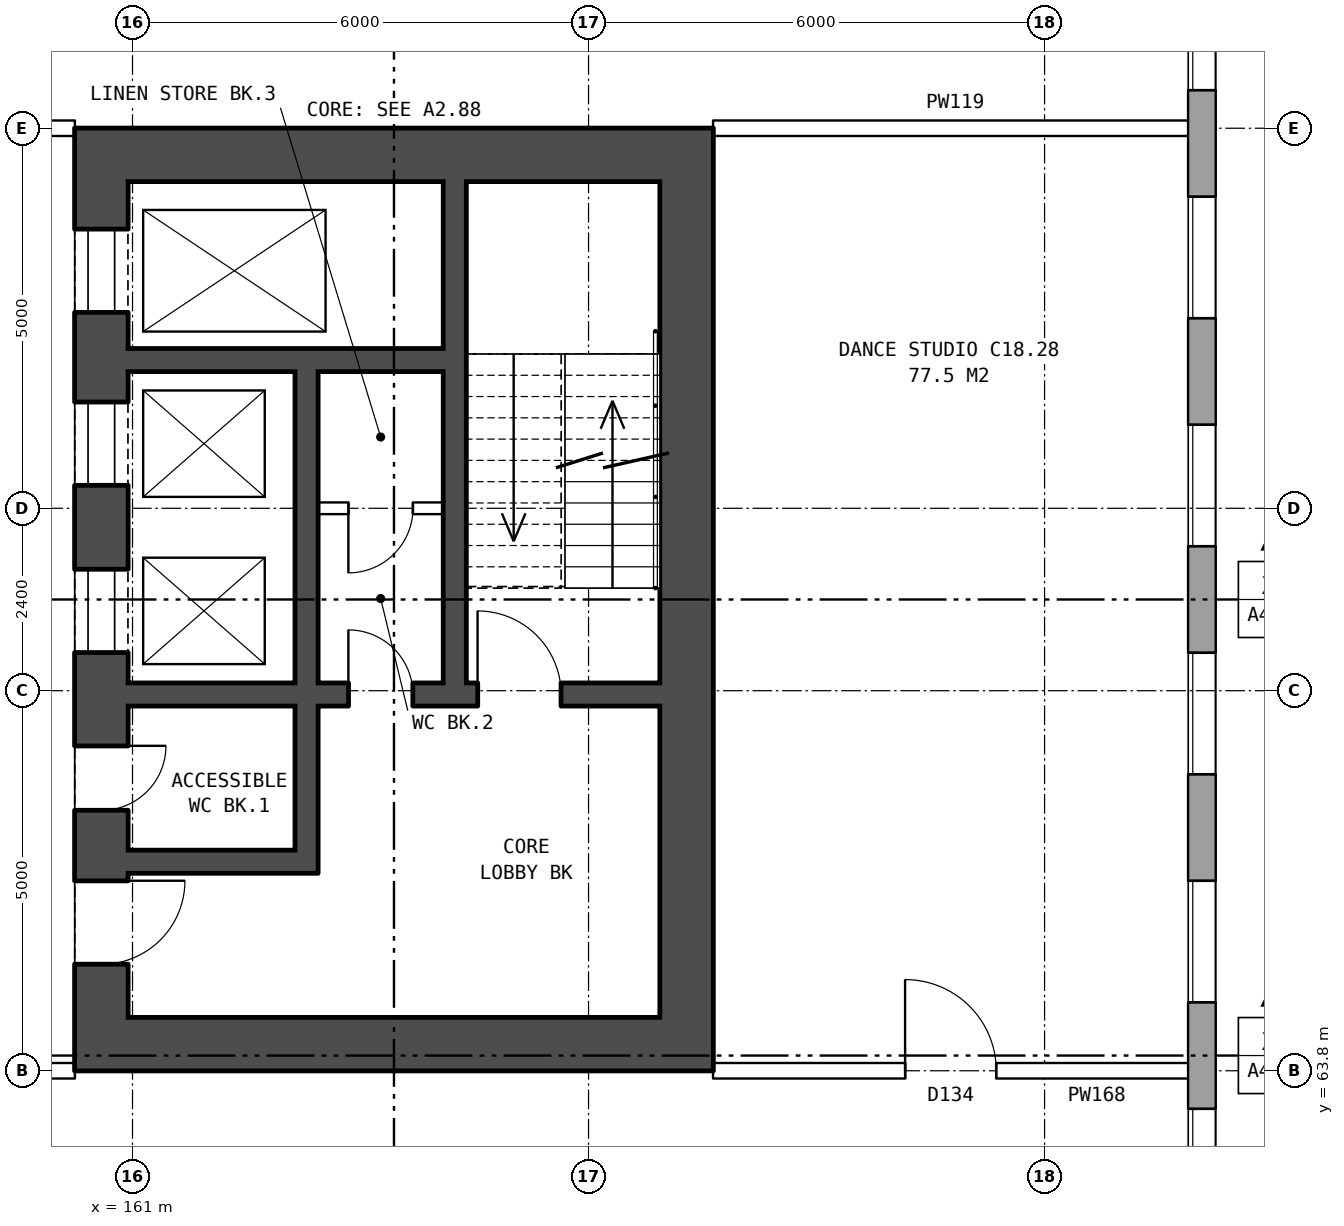
"""IFC4 building model, lengths in metres.
Left out: names, types, materials, properties, quantities, classifications, styles, units other than length and angle.
Written with IfcOpenShell. Run it as: python <this file> out.ifc"""

import sys

from ifc_helpers import new_model, si_unit, direction, frame, frame_2d, origin, place, context, subcontext, project, spatial, rectangle, extrude, element, fill, save


model = new_model("IFC4")
c1 = context("Model", 3, precision=1e-05, world=origin(), true_north=direction((0.0, 1.0)))
c2 = subcontext(c1, "Body", "Model", "MODEL_VIEW")
j1 = project(units=[si_unit("LENGTHUNIT", "METRE"), si_unit("PLANEANGLEUNIT", "RADIAN")], contexts=[c1])
p1 = place(None, origin())
s1 = spatial("IfcSite", under=j1, at=p1, CompositionType="ELEMENT")
p2 = place(p1, origin())
s2 = spatial("IfcBuilding", under=s1, at=p2, CompositionType="ELEMENT")
p3 = place(p2, frame((0.0, 0.0, 67.4)))
s3 = spatial("IfcBuildingStorey", under=s2, at=p3, CompositionType="ELEMENT", Elevation=67.4)
p4 = place(p3, frame((175.07, 57.075, 0.0), z_axis=(0.0, 0.0, 1.0), x_axis=(0.0, 1.0, 0.0)))
e1 = element("IfcWall", 1, at=p4, inside=s3, PredefinedType="STANDARD", context=c2, shape_type="SweptSolid", body=[
    extrude(rectangle(XDim=25.851, YDim=0.36, at=frame_2d((12.925, 0.0))), origin(), (0.0, 0.0, 1.0), 3.6),
])
p5 = place(p4, frame((1.625, 0.0, 0.8)))
e2 = element("IfcOpeningElement", 2, at=p5, cuts=e1, PredefinedType="OPENING", context=c2, shape_type="SweptSolid", body=[
    extrude(rectangle(XDim=1.6, YDim=1.8, at=frame_2d((0.8, 0.9))), frame((0.0, 0.19, 0.0), z_axis=(0.0, -1.0, 0.0), x_axis=(1.0, 0.0, 0.0)), (0.0, 0.0, 1.0), 0.38),
])
p6 = place(p4, frame((4.625, 0.0, 0.8)))
e3 = element("IfcOpeningElement", 3, at=p6, cuts=e1, PredefinedType="OPENING", context=c2, shape_type="SweptSolid", body=[
    extrude(rectangle(XDim=1.6, YDim=1.8, at=frame_2d((0.8, 0.9))), frame((0.0, 0.19, 0.0), z_axis=(0.0, -1.0, 0.0), x_axis=(1.0, 0.0, 0.0)), (0.0, 0.0, 1.0), 0.38),
])
p7 = place(p4, frame((7.625, 0.0, 0.8)))
e4 = element("IfcOpeningElement", 4, at=p7, cuts=e1, PredefinedType="OPENING", context=c2, shape_type="SweptSolid", body=[
    extrude(rectangle(XDim=1.6, YDim=1.8, at=frame_2d((0.8, 0.9))), frame((0.0, 0.19, 0.0), z_axis=(0.0, -1.0, 0.0), x_axis=(1.0, 0.0, 0.0)), (0.0, 0.0, 1.0), 0.38),
])
p8 = place(p4, frame((10.625, 0.0, 0.8)))
e5 = element("IfcOpeningElement", 5, at=p8, cuts=e1, PredefinedType="OPENING", context=c2, shape_type="SweptSolid", body=[
    extrude(rectangle(XDim=1.6, YDim=1.8, at=frame_2d((0.8, 0.9))), frame((0.0, 0.19, 0.0), z_axis=(0.0, -1.0, 0.0), x_axis=(1.0, 0.0, 0.0)), (0.0, 0.0, 1.0), 0.38),
])
p9 = place(p4, frame((13.625, 0.0, 0.8)))
e6 = element("IfcOpeningElement", 6, at=p9, cuts=e1, PredefinedType="OPENING", context=c2, shape_type="SweptSolid", body=[
    extrude(rectangle(XDim=1.6, YDim=1.8, at=frame_2d((0.8, 0.9))), frame((0.0, 0.19, 0.0), z_axis=(0.0, -1.0, 0.0), x_axis=(1.0, 0.0, 0.0)), (0.0, 0.0, 1.0), 0.38),
])
p10 = place(p4, frame((16.625, 0.0, 0.8)))
e7 = element("IfcOpeningElement", 7, at=p10, cuts=e1, PredefinedType="OPENING", context=c2, shape_type="SweptSolid", body=[
    extrude(rectangle(XDim=1.6, YDim=1.8, at=frame_2d((0.8, 0.9))), frame((0.0, 0.19, 0.0), z_axis=(0.0, -1.0, 0.0), x_axis=(1.0, 0.0, 0.0)), (0.0, 0.0, 1.0), 0.38),
])
p11 = place(p4, frame((19.625, 0.0, 0.8)))
e8 = element("IfcOpeningElement", 8, at=p11, cuts=e1, PredefinedType="OPENING", context=c2, shape_type="SweptSolid", body=[
    extrude(rectangle(XDim=1.6, YDim=1.8, at=frame_2d((0.8, 0.9))), frame((0.0, 0.19, 0.0), z_axis=(0.0, -1.0, 0.0), x_axis=(1.0, 0.0, 0.0)), (0.0, 0.0, 1.0), 0.38),
])
p12 = place(p4, frame((22.625, 0.0, 0.8)))
e9 = element("IfcOpeningElement", 9, at=p12, cuts=e1, PredefinedType="OPENING", context=c2, shape_type="SweptSolid", body=[
    extrude(rectangle(XDim=1.6, YDim=1.8, at=frame_2d((0.8, 0.9))), frame((0.0, 0.19, 0.0), z_axis=(0.0, -1.0, 0.0), x_axis=(1.0, 0.0, 0.0)), (0.0, 0.0, 1.0), 0.38),
])
p13 = place(p3, frame((160.59, 75.5, 0.0), z_axis=(0.0, 0.0, 1.0), x_axis=(0.0, -1.0, 0.0)))
e10 = element("IfcWall", 10, at=p13, inside=s3, PredefinedType="SHEAR", context=c2, shape_type="SweptSolid", body=[
    extrude(rectangle(XDim=11.0, YDim=0.7, at=frame_2d((5.5, 0.0))), origin(), (0.0, 0.0, 1.0), 3.6),
])
p14 = place(p13, frame((0.625, 0.0, 0.0)))
e11 = element("IfcOpeningElement", 11, at=p14, cuts=e10, PredefinedType="OPENING", context=c2, shape_type="SweptSolid", body=[
    extrude(rectangle(XDim=1.1, YDim=2.1, at=frame_2d((0.55, 1.05))), frame((0.0, 0.36, 0.0), z_axis=(0.0, -1.0, 0.0), x_axis=(1.0, 0.0, 0.0)), (0.0, 0.0, 1.0), 0.72),
])
p15 = place(p13, frame((2.9, 0.0, 0.0)))
e12 = element("IfcOpeningElement", 12, at=p15, cuts=e10, PredefinedType="OPENING", context=c2, shape_type="SweptSolid", body=[
    extrude(rectangle(XDim=1.1, YDim=2.1, at=frame_2d((0.55, 1.05))), frame((0.0, 0.36, 0.0), z_axis=(0.0, -1.0, 0.0), x_axis=(1.0, 0.0, 0.0)), (0.0, 0.0, 1.0), 0.72),
])
p16 = place(p13, frame((5.1, 0.0, 0.0)))
e13 = element("IfcOpeningElement", 13, at=p16, cuts=e10, PredefinedType="OPENING", context=c2, shape_type="SweptSolid", body=[
    extrude(rectangle(XDim=1.1, YDim=2.1, at=frame_2d((0.55, 1.05))), frame((0.0, 0.36, 0.0), z_axis=(0.0, -1.0, 0.0), x_axis=(1.0, 0.0, 0.0)), (0.0, 0.0, 1.0), 0.72),
])
p17 = place(p13, frame((9.2, 0.0, 0.0)))
e14 = element("IfcOpeningElement", 14, at=p17, cuts=e10, PredefinedType="OPENING", context=c2, shape_type="SweptSolid", body=[
    extrude(rectangle(XDim=1.1, YDim=2.1, at=frame_2d((0.55, 1.05))), frame((0.0, 0.36, 0.0), z_axis=(0.0, -1.0, 0.0), x_axis=(1.0, 0.0, 0.0)), (0.0, 0.0, 1.0), 0.72),
])
p18 = place(p13, frame((7.425, 0.0, 0.0)))
e15 = element("IfcOpeningElement", 15, at=p18, cuts=e10, PredefinedType="OPENING", context=c2, shape_type="SweptSolid", body=[
    extrude(rectangle(XDim=0.85, YDim=2.1, at=frame_2d((0.425, 1.05))), frame((0.0, 0.36, 0.0), z_axis=(0.0, -1.0, 0.0), x_axis=(1.0, 0.0, 0.0)), (0.0, 0.0, 1.0), 0.72),
])
p19 = place(p3, frame((168.29, 75.5, 0.0), z_axis=(0.0, 0.0, 1.0), x_axis=(0.0, -1.0, 0.0)))
e16 = element("IfcWall", 16, at=p19, inside=s3, PredefinedType="SHEAR", context=c2, shape_type="SweptSolid", body=[
    extrude(rectangle(XDim=11.0, YDim=0.7, at=frame_2d((5.5, 0.0))), origin(), (0.0, 0.0, 1.0), 3.6),
])
for number, where, z_axis, x_axis in (
    (17, (160.24, 75.85, 0.0), (0.0, 0.0, 1.0), (1.0, 0.0, 0.0)),
    (18, (160.24, 64.15, 0.0), (0.0, 0.0, 1.0), (1.0, 0.0, 0.0)),
):
    element("IfcWall", number, at=place(p3, frame(where, z_axis=z_axis, x_axis=x_axis)), inside=s3, PredefinedType="SHEAR", context=c2, shape_type="SweptSolid", body=[
        extrude(rectangle(XDim=8.4, YDim=0.7, at=frame_2d((4.2, 0.0))), origin(), (0.0, 0.0, 1.0), 3.6),
    ])
p20 = place(p3, frame((160.94, 73.15, 0.0), z_axis=(0.0, 0.0, 1.0), x_axis=(1.0, 0.0, 0.0)))
e19 = element("IfcWall", 19, at=p20, inside=s3, PredefinedType="SHEAR", context=c2, shape_type="SweptSolid", body=[
    extrude(rectangle(XDim=4.15, YDim=0.3, at=frame_2d((2.075, 0.0))), origin(), (0.0, 0.0, 1.0), 3.6),
])
p21 = place(p3, frame((163.44, 71.2, 0.0), z_axis=(0.0, 0.0, 1.0), x_axis=(1.0, 0.0, 0.0)))
e20 = element("IfcWall", 20, at=p21, inside=s3, PredefinedType="PARTITIONING", context=c2, shape_type="SweptSolid", body=[
    extrude(rectangle(XDim=1.65, YDim=0.15, at=frame_2d((0.825, 0.0))), origin(), (0.0, 0.0, 1.0), 3.6),
])
p22 = place(p21, frame((0.4, 0.0, 0.0)))
e21 = element("IfcOpeningElement", 21, at=p22, cuts=e20, PredefinedType="OPENING", context=c2, shape_type="SweptSolid", body=[
    extrude(rectangle(XDim=0.85, YDim=2.1, at=frame_2d((0.425, 1.05))), frame((0.0, 0.085, 0.0), z_axis=(0.0, -1.0, 0.0), x_axis=(1.0, 0.0, 0.0)), (0.0, 0.0, 1.0), 0.17),
])
p23 = place(p3, frame((160.94, 68.75, 0.0), z_axis=(0.0, 0.0, 1.0), x_axis=(1.0, 0.0, 0.0)))
e22 = element("IfcWall", 22, at=p23, inside=s3, PredefinedType="SHEAR", context=c2, shape_type="SweptSolid", body=[
    extrude(rectangle(XDim=7.0, YDim=0.3, at=frame_2d((3.5, 0.0))), origin(), (0.0, 0.0, 1.0), 3.6),
])
p24 = place(p23, frame((4.6, 0.0, 0.0)))
e23 = element("IfcOpeningElement", 23, at=p24, cuts=e22, PredefinedType="OPENING", context=c2, shape_type="SweptSolid", body=[
    extrude(rectangle(XDim=1.1, YDim=2.1, at=frame_2d((0.55, 1.05))), frame((0.0, 0.16, 0.0), z_axis=(0.0, -1.0, 0.0), x_axis=(1.0, 0.0, 0.0)), (0.0, 0.0, 1.0), 0.32),
])
p25 = place(p23, frame((2.9, 0.0, 0.0)))
e24 = element("IfcOpeningElement", 24, at=p25, cuts=e22, PredefinedType="OPENING", context=c2, shape_type="SweptSolid", body=[
    extrude(rectangle(XDim=0.85, YDim=2.1, at=frame_2d((0.425, 1.05))), frame((0.0, 0.16, 0.0), z_axis=(0.0, -1.0, 0.0), x_axis=(1.0, 0.0, 0.0)), (0.0, 0.0, 1.0), 0.32),
])
p26 = place(p3, frame((160.94, 66.55, 0.0), z_axis=(0.0, 0.0, 1.0), x_axis=(1.0, 0.0, 0.0)))
e25 = element("IfcWall", 25, at=p26, inside=s3, PredefinedType="SHEAR", context=c2, shape_type="SweptSolid", body=[
    extrude(rectangle(XDim=2.2, YDim=0.3, at=frame_2d((1.1, 0.0))), origin(), (0.0, 0.0, 1.0), 3.6),
])
p27 = place(p3, frame((163.29, 73.0, 0.0), z_axis=(0.0, 0.0, 1.0), x_axis=(0.0, -1.0, 0.0)))
e26 = element("IfcWall", 26, at=p27, inside=s3, PredefinedType="SHEAR", context=c2, shape_type="SweptSolid", body=[
    extrude(rectangle(XDim=4.1, YDim=0.3, at=frame_2d((2.05, 0.0))), origin(), (0.0, 0.0, 1.0), 3.6),
])
p28 = place(p3, frame((163.29, 68.6, 0.0), z_axis=(0.0, 0.0, 1.0), x_axis=(0.0, -1.0, 0.0)))
e27 = element("IfcWall", 27, at=p28, inside=s3, PredefinedType="SHEAR", context=c2, shape_type="SweptSolid", body=[
    extrude(rectangle(XDim=2.2, YDim=0.3, at=frame_2d((1.1, 0.0))), origin(), (0.0, 0.0, 1.0), 3.6),
])
p29 = place(p3, frame((165.24, 75.5, 0.0), z_axis=(0.0, 0.0, 1.0), x_axis=(0.0, -1.0, 0.0)))
e28 = element("IfcWall", 28, at=p29, inside=s3, PredefinedType="SHEAR", context=c2, shape_type="SweptSolid", body=[
    extrude(rectangle(XDim=6.6, YDim=0.3, at=frame_2d((3.3, 0.0))), origin(), (0.0, 0.0, 1.0), 3.6),
])
p30 = place(p3, frame((168.64, 63.8, 0.0), z_axis=(0.0, 0.0, 1.0), x_axis=(1.0, 0.0, 0.0)))
e29 = element("IfcWall", 29, at=p30, inside=s3, PredefinedType="PARTITIONING", context=c2, shape_type="SweptSolid", body=[
    extrude(rectangle(XDim=6.37, YDim=0.2, at=frame_2d((3.185, 0.0))), origin(), (0.0, 0.0, 1.0), 3.6),
])
p31 = place(p30, frame((2.525, 0.0, 0.0)))
e30 = element("IfcOpeningElement", 30, at=p31, cuts=e29, PredefinedType="OPENING", context=c2, shape_type="SweptSolid", body=[
    extrude(rectangle(XDim=1.2, YDim=2.1, at=frame_2d((0.6, 1.05))), frame((0.0, 0.11, 0.0), z_axis=(0.0, -1.0, 0.0), x_axis=(1.0, 0.0, 0.0)), (0.0, 0.0, 1.0), 0.22),
])
p32 = place(p3, frame((157.24, 63.8, 0.0), z_axis=(0.0, 0.0, 1.0), x_axis=(1.0, 0.0, 0.0)))
e31 = element("IfcWall", 31, at=p32, inside=s3, PredefinedType="PARTITIONING", context=c2, shape_type="SweptSolid", body=[
    extrude(rectangle(XDim=3.0, YDim=0.2, at=frame_2d((1.5, 0.0))), origin(), (0.0, 0.0, 1.0), 3.6),
])
p33 = place(p32, frame((1.0, 0.0, 0.0)))
e32 = element("IfcOpeningElement", 32, at=p33, cuts=e31, PredefinedType="OPENING", context=c2, shape_type="SweptSolid", body=[
    extrude(rectangle(XDim=1.0, YDim=2.1, at=frame_2d((0.5, 1.05))), frame((0.0, 0.11, 0.0), z_axis=(0.0, -1.0, 0.0), x_axis=(1.0, 0.0, 0.0)), (0.0, 0.0, 1.0), 0.22),
])
p34 = place(p3, frame((168.64, 76.2, 0.0), z_axis=(0.0, 0.0, 1.0), x_axis=(1.0, 0.0, 0.0)))
e33 = element("IfcWall", 33, at=p34, inside=s3, PredefinedType="PARTITIONING", context=c2, shape_type="SweptSolid", body=[
    extrude(rectangle(XDim=6.37, YDim=0.2, at=frame_2d((3.185, 0.0))), origin(), (0.0, 0.0, 1.0), 3.6),
])
p35 = place(p3, frame((157.24, 76.2, 0.0), z_axis=(0.0, 0.0, 1.0), x_axis=(1.0, 0.0, 0.0)))
e34 = element("IfcWall", 34, at=p35, inside=s3, PredefinedType="PARTITIONING", context=c2, shape_type="SweptSolid", body=[
    extrude(rectangle(XDim=3.0, YDim=0.2, at=frame_2d((1.5, 0.0))), origin(), (0.0, 0.0, 1.0), 3.6),
])
p36 = place(p35, frame((1.0, 0.0, 0.0)))
e35 = element("IfcOpeningElement", 35, at=p36, cuts=e34, PredefinedType="OPENING", context=c2, shape_type="SweptSolid", body=[
    extrude(rectangle(XDim=1.0, YDim=2.1, at=frame_2d((0.5, 1.05))), frame((0.0, 0.11, 0.0), z_axis=(0.0, -1.0, 0.0), x_axis=(1.0, 0.0, 0.0)), (0.0, 0.0, 1.0), 0.22),
])
p37 = place(p6, origin())
e36 = element("IfcWindow", 36, at=p37, inside=s3, PartitioningType="SINGLE_PANEL", PredefinedType="WINDOW", context=c2, shape_type="SweptSolid", body=[
    extrude(rectangle(XDim=1.6, YDim=1.8, at=frame_2d((0.8, 0.9))), frame((0.0, 0.15, 0.0), z_axis=(0.0, -1.0, 0.0), x_axis=(1.0, 0.0, 0.0)), (0.0, 0.0, 1.0), 0.06),
])
fill(e3, e36)
p38 = place(p7, origin())
e37 = element("IfcWindow", 37, at=p38, inside=s3, PartitioningType="SINGLE_PANEL", PredefinedType="WINDOW", context=c2, shape_type="SweptSolid", body=[
    extrude(rectangle(XDim=1.6, YDim=1.8, at=frame_2d((0.8, 0.9))), frame((0.0, 0.15, 0.0), z_axis=(0.0, -1.0, 0.0), x_axis=(1.0, 0.0, 0.0)), (0.0, 0.0, 1.0), 0.06),
])
fill(e4, e37)
p39 = place(p8, origin())
e38 = element("IfcWindow", 38, at=p39, inside=s3, PartitioningType="SINGLE_PANEL", PredefinedType="WINDOW", context=c2, shape_type="SweptSolid", body=[
    extrude(rectangle(XDim=1.6, YDim=1.8, at=frame_2d((0.8, 0.9))), frame((0.0, 0.15, 0.0), z_axis=(0.0, -1.0, 0.0), x_axis=(1.0, 0.0, 0.0)), (0.0, 0.0, 1.0), 0.06),
])
fill(e5, e38)
p40 = place(p9, origin())
e39 = element("IfcWindow", 39, at=p40, inside=s3, PartitioningType="SINGLE_PANEL", PredefinedType="WINDOW", context=c2, shape_type="SweptSolid", body=[
    extrude(rectangle(XDim=1.6, YDim=1.8, at=frame_2d((0.8, 0.9))), frame((0.0, 0.15, 0.0), z_axis=(0.0, -1.0, 0.0), x_axis=(1.0, 0.0, 0.0)), (0.0, 0.0, 1.0), 0.06),
])
fill(e6, e39)
p41 = place(p10, origin())
e40 = element("IfcWindow", 40, at=p41, inside=s3, PartitioningType="SINGLE_PANEL", PredefinedType="WINDOW", context=c2, shape_type="SweptSolid", body=[
    extrude(rectangle(XDim=1.6, YDim=1.8, at=frame_2d((0.8, 0.9))), frame((0.0, 0.15, 0.0), z_axis=(0.0, -1.0, 0.0), x_axis=(1.0, 0.0, 0.0)), (0.0, 0.0, 1.0), 0.06),
])
fill(e7, e40)
p42 = place(p11, origin())
e41 = element("IfcWindow", 41, at=p42, inside=s3, PartitioningType="SINGLE_PANEL", PredefinedType="WINDOW", context=c2, shape_type="SweptSolid", body=[
    extrude(rectangle(XDim=1.6, YDim=1.8, at=frame_2d((0.8, 0.9))), frame((0.0, 0.15, 0.0), z_axis=(0.0, -1.0, 0.0), x_axis=(1.0, 0.0, 0.0)), (0.0, 0.0, 1.0), 0.06),
])
fill(e8, e41)
p43 = place(p14, origin())
e42 = element("IfcDoor", 42, at=p43, inside=s3, OperationType="DOUBLE_DOOR_SLIDING", PredefinedType="DOOR", context=c2, shape_type="SweptSolid", body=[
    extrude(rectangle(XDim=1.1, YDim=2.1, at=frame_2d((0.55, 1.05))), frame((0.0, 0.335, 0.0), z_axis=(0.0, -1.0, 0.0), x_axis=(1.0, 0.0, 0.0)), (0.0, 0.0, 1.0), 0.05),
])
fill(e11, e42)
p44 = place(p15, origin())
e43 = element("IfcDoor", 43, at=p44, inside=s3, OperationType="DOUBLE_DOOR_SLIDING", PredefinedType="DOOR", context=c2, shape_type="SweptSolid", body=[
    extrude(rectangle(XDim=1.1, YDim=2.1, at=frame_2d((0.55, 1.05))), frame((0.0, 0.335, 0.0), z_axis=(0.0, -1.0, 0.0), x_axis=(1.0, 0.0, 0.0)), (0.0, 0.0, 1.0), 0.05),
])
fill(e12, e43)
p45 = place(p16, origin())
e44 = element("IfcDoor", 44, at=p45, inside=s3, OperationType="DOUBLE_DOOR_SLIDING", PredefinedType="DOOR", context=c2, shape_type="SweptSolid", body=[
    extrude(rectangle(XDim=1.1, YDim=2.1, at=frame_2d((0.55, 1.05))), frame((0.0, 0.335, 0.0), z_axis=(0.0, -1.0, 0.0), x_axis=(1.0, 0.0, 0.0)), (0.0, 0.0, 1.0), 0.05),
])
fill(e13, e44)
p46 = place(p17, origin())
e45 = element("IfcDoor", 45, at=p46, inside=s3, OperationType="SINGLE_SWING_LEFT", PredefinedType="DOOR", context=c2, shape_type="SweptSolid", body=[
    extrude(rectangle(XDim=1.1, YDim=2.1, at=frame_2d((0.55, 1.05))), frame((0.0, 0.335, 0.0), z_axis=(0.0, -1.0, 0.0), x_axis=(1.0, 0.0, 0.0)), (0.0, 0.0, 1.0), 0.05),
])
fill(e14, e45)
p47 = place(p24, origin())
e46 = element("IfcDoor", 46, at=p47, inside=s3, OperationType="SINGLE_SWING_LEFT", PredefinedType="DOOR", context=c2, shape_type="SweptSolid", body=[
    extrude(rectangle(XDim=1.1, YDim=2.1, at=frame_2d((0.55, 1.05))), frame((0.0, 0.025, 0.0), z_axis=(0.0, -1.0, 0.0), x_axis=(1.0, 0.0, 0.0)), (0.0, 0.0, 1.0), 0.05),
])
fill(e23, e46)
p48 = place(p18, origin())
e47 = element("IfcDoor", 47, at=p48, inside=s3, OperationType="SINGLE_SWING_LEFT", PredefinedType="DOOR", context=c2, shape_type="SweptSolid", body=[
    extrude(rectangle(XDim=0.85, YDim=2.1, at=frame_2d((0.425, 1.05))), frame((0.0, 0.335, 0.0), z_axis=(0.0, -1.0, 0.0), x_axis=(1.0, 0.0, 0.0)), (0.0, 0.0, 1.0), 0.05),
])
fill(e15, e47)
p49 = place(p25, origin())
e48 = element("IfcDoor", 48, at=p49, inside=s3, OperationType="SINGLE_SWING_LEFT", PredefinedType="DOOR", context=c2, shape_type="SweptSolid", body=[
    extrude(rectangle(XDim=0.85, YDim=2.1, at=frame_2d((0.425, 1.05))), frame((0.0, 0.025, 0.0), z_axis=(0.0, -1.0, 0.0), x_axis=(1.0, 0.0, 0.0)), (0.0, 0.0, 1.0), 0.05),
])
fill(e24, e48)
p50 = place(p22, frame((0.85, 0.0, 0.0), z_axis=(0.0, 0.0, 1.0), x_axis=(-1.0, 0.0, 0.0)))
e49 = element("IfcDoor", 49, at=p50, inside=s3, OperationType="SINGLE_SWING_RIGHT", PredefinedType="DOOR", context=c2, shape_type="SweptSolid", body=[
    extrude(rectangle(XDim=0.85, YDim=2.1, at=frame_2d((0.425, 1.05))), frame((0.0, 0.025, 0.0), z_axis=(0.0, -1.0, 0.0), x_axis=(1.0, 0.0, 0.0)), (0.0, 0.0, 1.0), 0.05),
])
fill(e21, e49)
p51 = place(p31, origin())
e50 = element("IfcDoor", 50, at=p51, inside=s3, OperationType="SINGLE_SWING_LEFT", PredefinedType="DOOR", context=c2, shape_type="SweptSolid", body=[
    extrude(rectangle(XDim=1.2, YDim=2.1, at=frame_2d((0.6, 1.05))), frame((0.0, 0.025, 0.0), z_axis=(0.0, -1.0, 0.0), x_axis=(1.0, 0.0, 0.0)), (0.0, 0.0, 1.0), 0.05),
])
fill(e30, e50)
save(model, sys.argv[1])
